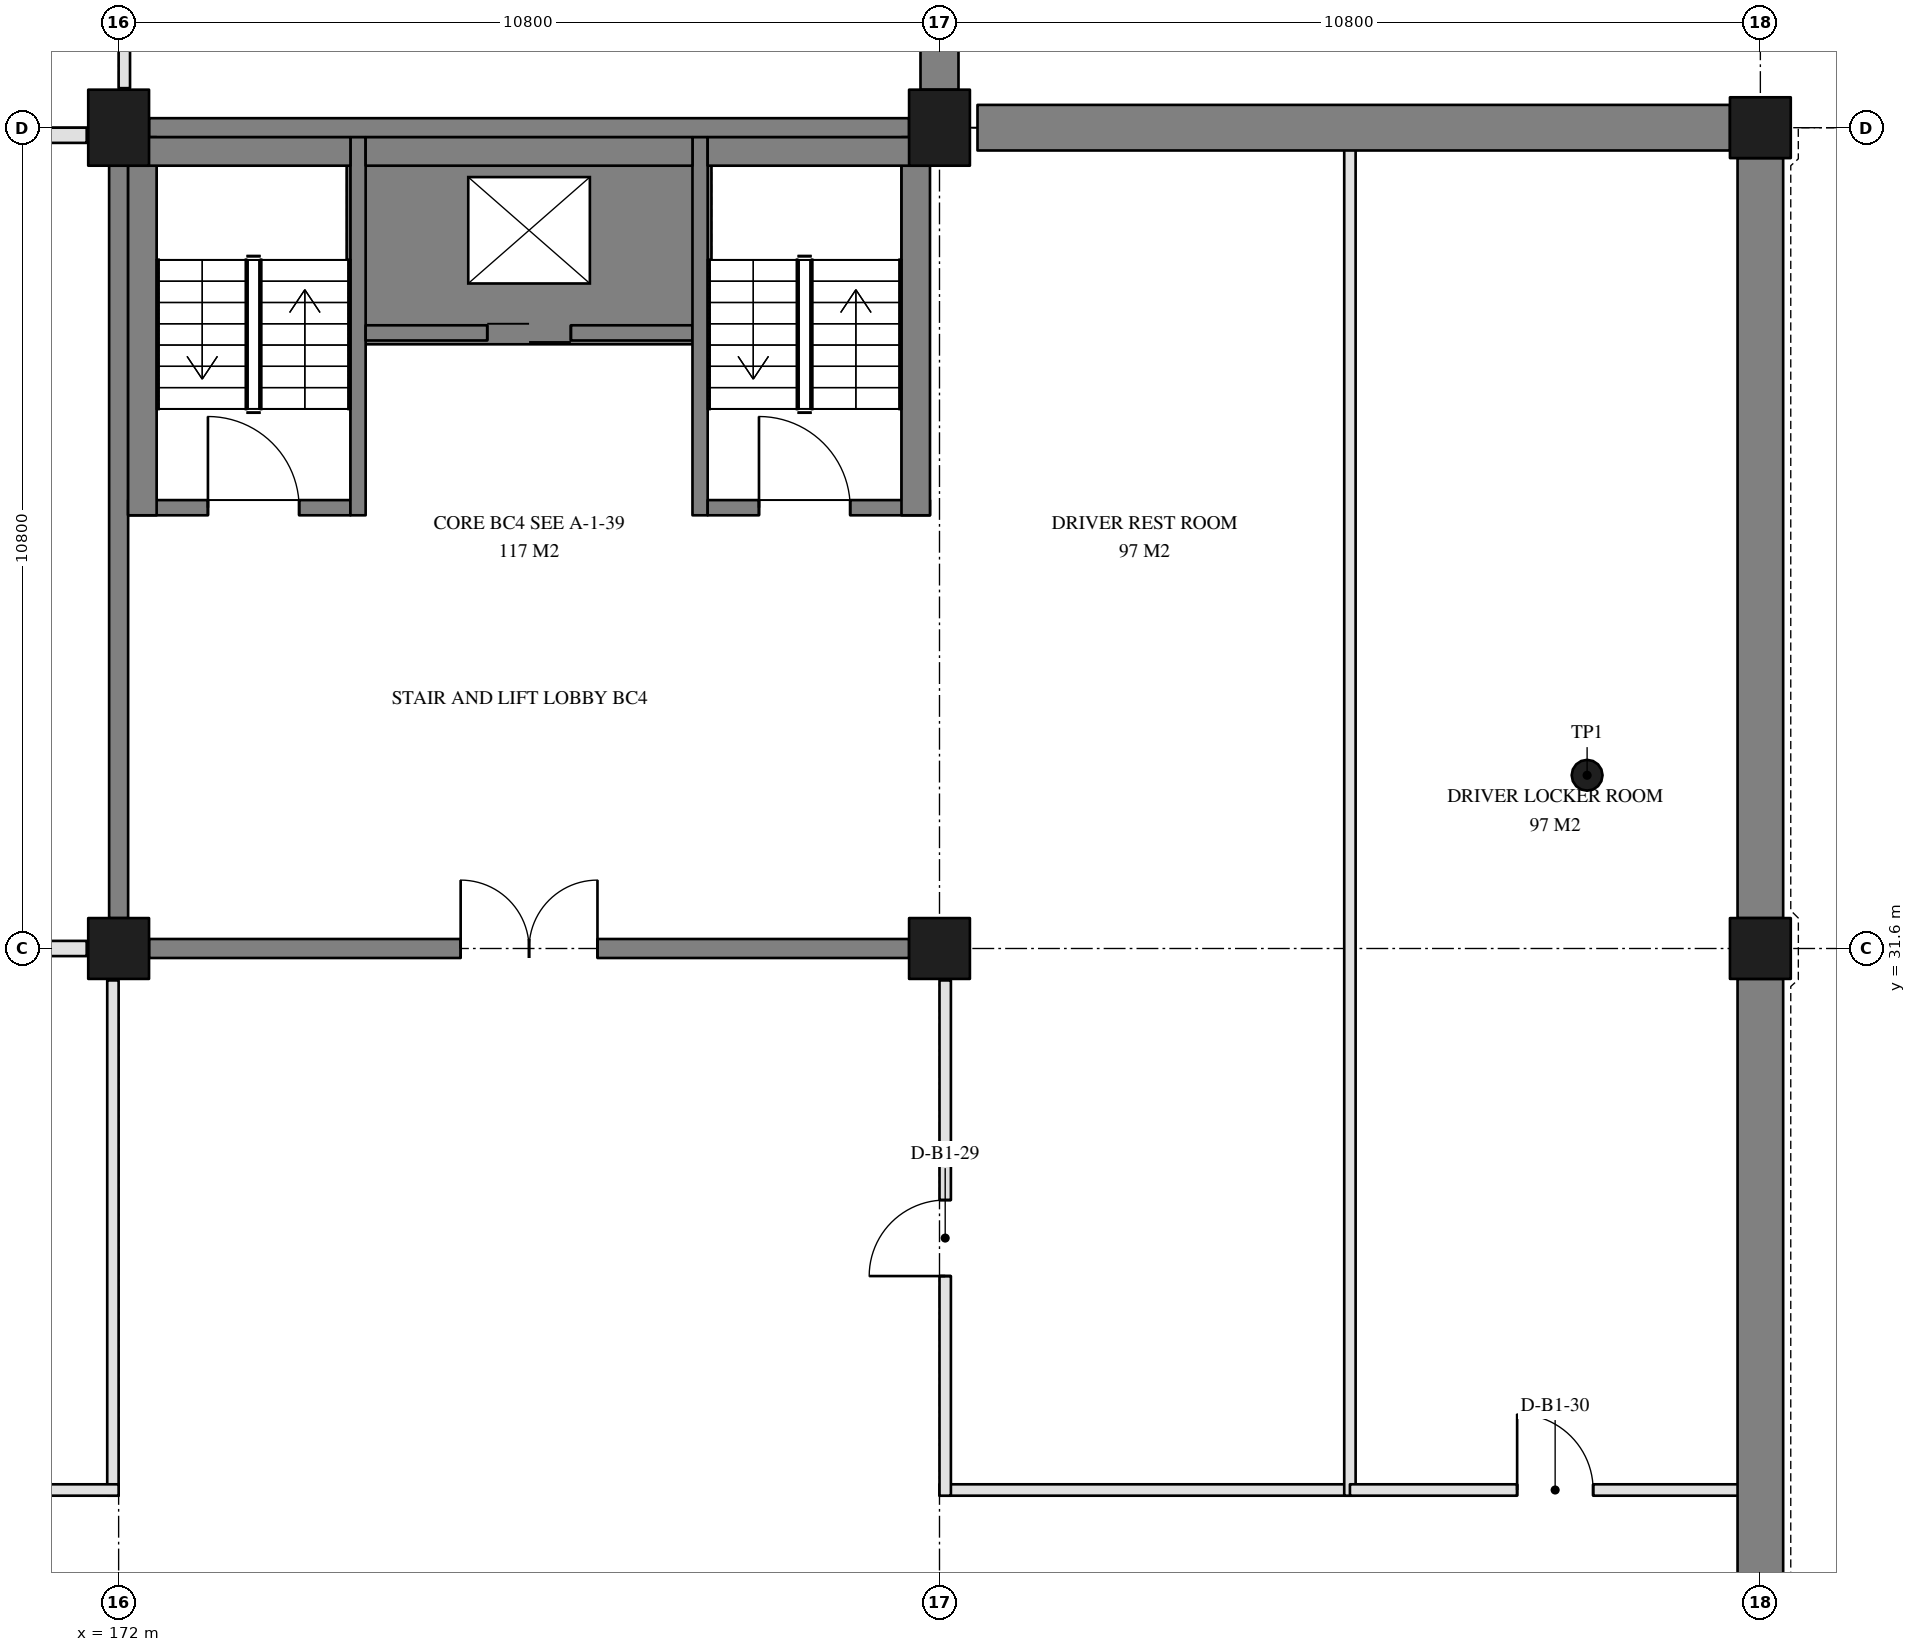
"""IFC4 building model, lengths in metres.
Left out: names, types, materials, properties, quantities, classifications, styles, units other than length and angle.
Written with IfcOpenShell. Run it as: python <this file> out.ifc"""

import sys

from ifc_helpers import new_model, si_unit, direction, frame, frame_2d, origin, origin_2d, place, context, subcontext, project, spatial, polyline, rectangle, hollow_circle, outline, extrude, element, fill, save


model = new_model("IFC4")
c1 = context("Model", 3, precision=1e-05, world=origin(), true_north=direction((0.0, 1.0)))
c2 = subcontext(c1, "Body", "Model", "MODEL_VIEW")
j1 = project(units=[si_unit("LENGTHUNIT", "METRE"), si_unit("PLANEANGLEUNIT", "RADIAN")], contexts=[c1])
p1 = place(None, origin())
s1 = spatial("IfcSite", under=j1, at=p1, CompositionType="ELEMENT")
p2 = place(p1, origin())
s2 = spatial("IfcBuilding", under=s1, at=p2, CompositionType="ELEMENT")
p3 = place(p2, frame((0.0, 0.0, -5.4)))
s3 = spatial("IfcBuildingStorey", under=s2, at=p3, CompositionType="ELEMENT", Elevation=-5.4)
for number, where, z_axis, x_axis in (
    (1, (172.0, 42.4, -0.4), (0.0, 0.0, 1.0), (1.0, 0.0, 0.0)),
    (2, (182.8, 42.4, -0.4), (0.0, 0.0, 1.0), (1.0, 0.0, 0.0)),
):
    element("IfcColumn", number, at=place(p3, frame(where, z_axis=z_axis, x_axis=x_axis)), inside=s3, PredefinedType="COLUMN", context=c2, shape_type="SweptSolid", body=[
        extrude(rectangle(XDim=0.8, YDim=1.0, at=origin_2d()), origin(), (0.0, 0.0, 1.0), 5.8),
    ])
for number, where, z_axis, x_axis in (
    (3, (172.0, 31.6, -0.4), (0.0, 0.0, 1.0), (1.0, 0.0, 0.0)),
    (4, (182.8, 31.6, -0.4), (0.0, 0.0, 1.0), (1.0, 0.0, 0.0)),
    (5, (193.6, 31.6, -0.4), (0.0, 0.0, 1.0), (1.0, 0.0, 0.0)),
    (6, (193.6, 42.4, -0.4), (0.0, 0.0, 1.0), (1.0, 0.0, 0.0)),
):
    element("IfcColumn", number, at=place(p3, frame(where, z_axis=z_axis, x_axis=x_axis)), inside=s3, PredefinedType="COLUMN", context=c2, shape_type="SweptSolid", body=[
        extrude(rectangle(XDim=0.8, YDim=0.8, at=origin_2d()), origin(), (0.0, 0.0, 1.0), 5.8),
    ])
p4 = place(p3, frame((191.321, 33.879, 3.6), z_axis=(0.0, 0.0, 1.0), x_axis=(1.0, 0.0, 0.0)))
e7 = element("IfcColumn", 7, at=p4, inside=s3, PredefinedType="COLUMN", context=c2, shape_type="SweptSolid", body=[
    extrude(hollow_circle(Radius=0.203, WallThickness=0.016, at=origin_2d()), origin(), (0.0, 0.0, 1.0), 1.8),
])
p5 = place(p3, frame((0.0, 0.0, -1.4)))
e8 = element("IfcWall", 8, at=p5, inside=s3, PredefinedType="SOLIDWALL", context=c2, shape_type="SweptSolid", body=[
    extrude(outline(polyline([(175.0, 39.55), (179.8, 39.55), (179.8, 42.15), (175.0, 42.15), (175.0, 39.55)]), holes=[polyline([(179.55, 39.8), (179.55, 41.9), (175.25, 41.9), (175.25, 39.8), (179.55, 39.8)])]), origin(), (0.0, 0.0, 1.0), 1.4),
])
p6 = place(p3, frame((172.4, 31.6, 0.0), z_axis=(0.0, 0.0, 1.0), x_axis=(1.0, 0.0, 0.0)))
e9 = element("IfcWall", 9, at=p6, inside=s3, PredefinedType="SOLIDWALL", context=c2, shape_type="SweptSolid", body=[
    extrude(rectangle(XDim=10.0, YDim=0.25, at=frame_2d((5.0, 0.0))), origin(), (0.0, 0.0, 1.0), 5.4),
])
p7 = place(p6, frame((4.1, 0.0, 0.0)))
e10 = element("IfcOpeningElement", 10, at=p7, cuts=e9, PredefinedType="OPENING", context=c2, shape_type="SweptSolid", body=[
    extrude(rectangle(XDim=1.8, YDim=2.1, at=frame_2d((0.9, 1.05))), frame((0.0, 0.135, 0.0), z_axis=(0.0, -1.0, 0.0), x_axis=(1.0, 0.0, 0.0)), (0.0, 0.0, 1.0), 0.27),
])
p8 = place(p3, frame((182.4, 42.4, 0.0), z_axis=(0.0, 0.0, 1.0), x_axis=(-1.0, 0.0, 0.0)))
e11 = element("IfcWall", 11, at=p8, inside=s3, PredefinedType="SOLIDWALL", context=c2, shape_type="SweptSolid", body=[
    extrude(rectangle(XDim=10.0, YDim=0.25, at=frame_2d((5.0, 0.0))), origin(), (0.0, 0.0, 1.0), 5.4),
])
p9 = place(p3, frame((172.0, 41.9, 0.0), z_axis=(0.0, 0.0, 1.0), x_axis=(0.0, -1.0, 0.0)))
e12 = element("IfcWall", 12, at=p9, inside=s3, PredefinedType="SOLIDWALL", context=c2, shape_type="SweptSolid", body=[
    extrude(rectangle(XDim=9.9, YDim=0.25, at=frame_2d((4.95, 0.0))), origin(), (0.0, 0.0, 1.0), 5.4),
])
for number, where, z_axis, x_axis in (
    (13, (193.6, 21.2, 0.0), (0.0, 0.0, 1.0), (0.0, 1.0, 0.0)),
    (14, (193.6, 32.0, 0.0), (0.0, 0.0, 1.0), (0.0, 1.0, 0.0)),
):
    element("IfcWall", number, at=place(p3, frame(where, z_axis=z_axis, x_axis=x_axis)), inside=s3, PredefinedType="SOLIDWALL", context=c2, shape_type="SweptSolid", body=[
        extrude(rectangle(XDim=10.0, YDim=0.6, at=frame_2d((5.0, 0.0))), origin(), (0.0, 0.0, 1.0), 3.8),
    ])
p10 = place(p3, frame((183.3, 42.4, 0.0), z_axis=(0.0, 0.0, 1.0), x_axis=(1.0, 0.0, 0.0)))
e15 = element("IfcWall", 15, at=p10, inside=s3, PredefinedType="SOLIDWALL", context=c2, shape_type="SweptSolid", body=[
    extrude(rectangle(XDim=9.9, YDim=0.6, at=frame_2d((4.95, 0.0))), origin(), (0.0, 0.0, 1.0), 3.8),
])
p11 = place(p3, frame((182.8, 42.9, 0.0), z_axis=(0.0, 0.0, 1.0), x_axis=(0.0, 1.0, 0.0)))
e16 = element("IfcWall", 16, at=p11, inside=s3, PredefinedType="SOLIDWALL", context=c2, shape_type="SweptSolid", body=[
    extrude(rectangle(XDim=9.8, YDim=0.5, at=frame_2d((4.9, 0.0))), origin(), (0.0, 0.0, 1.0), 3.8),
])
p12 = place(p3, frame((172.125, 37.4, 0.0), z_axis=(0.0, 0.0, 1.0), x_axis=(1.0, 0.0, 0.0)))
e17 = element("IfcWall", 17, at=p12, inside=s3, PredefinedType="SOLIDWALL", context=c2, shape_type="SweptSolid", body=[
    extrude(rectangle(XDim=2.925, YDim=0.2, at=frame_2d((1.462, 0.0))), origin(), (0.0, 0.0, 1.0), 4.8),
])
p13 = place(p12, frame((1.05, 0.0, 0.0)))
e18 = element("IfcOpeningElement", 18, at=p13, cuts=e17, PredefinedType="OPENING", context=c2, shape_type="SweptSolid", body=[
    extrude(rectangle(XDim=1.2, YDim=2.1, at=frame_2d((0.6, 1.05))), frame((0.0, 0.11, 0.0), z_axis=(0.0, -1.0, 0.0), x_axis=(1.0, 0.0, 0.0)), (0.0, 0.0, 1.0), 0.22),
])
p14 = place(p3, frame((175.15, 37.3, 0.0), z_axis=(0.0, 0.0, 1.0), x_axis=(0.0, 1.0, 0.0)))
e19 = element("IfcWall", 19, at=p14, inside=s3, PredefinedType="SOLIDWALL", context=c2, shape_type="SweptSolid", body=[
    extrude(rectangle(XDim=4.975, YDim=0.2, at=frame_2d((2.487, 0.0))), origin(), (0.0, 0.0, 1.0), 4.8),
])
p15 = place(p3, frame((175.25, 39.7, 0.0), z_axis=(0.0, 0.0, 1.0), x_axis=(1.0, 0.0, 0.0)))
e20 = element("IfcWall", 20, at=p15, inside=s3, PredefinedType="SOLIDWALL", context=c2, shape_type="SweptSolid", body=[
    extrude(rectangle(XDim=4.3, YDim=0.2, at=frame_2d((2.15, 0.0))), origin(), (0.0, 0.0, 1.0), 4.8),
])
p16 = place(p15, frame((1.6, 0.0, 0.0)))
e21 = element("IfcOpeningElement", 21, at=p16, cuts=e20, PredefinedType="OPENING", context=c2, shape_type="SweptSolid", body=[
    extrude(rectangle(XDim=1.1, YDim=2.1, at=frame_2d((0.55, 1.05))), frame((0.0, 0.11, 0.0), z_axis=(0.0, -1.0, 0.0), x_axis=(1.0, 0.0, 0.0)), (0.0, 0.0, 1.0), 0.22),
])
p17 = place(p3, frame((179.65, 37.3, 0.0), z_axis=(0.0, 0.0, 1.0), x_axis=(0.0, 1.0, 0.0)))
e22 = element("IfcWall", 22, at=p17, inside=s3, PredefinedType="SOLIDWALL", context=c2, shape_type="SweptSolid", body=[
    extrude(rectangle(XDim=4.975, YDim=0.2, at=frame_2d((2.487, 0.0))), origin(), (0.0, 0.0, 1.0), 4.8),
])
p18 = place(p3, frame((179.75, 37.4, 0.0), z_axis=(0.0, 0.0, 1.0), x_axis=(1.0, 0.0, 0.0)))
e23 = element("IfcWall", 23, at=p18, inside=s3, PredefinedType="SOLIDWALL", context=c2, shape_type="SweptSolid", body=[
    extrude(rectangle(XDim=2.925, YDim=0.2, at=frame_2d((1.462, 0.0))), origin(), (0.0, 0.0, 1.0), 4.8),
])
p19 = place(p18, frame((0.675, 0.0, 0.0)))
e24 = element("IfcOpeningElement", 24, at=p19, cuts=e23, PredefinedType="OPENING", context=c2, shape_type="SweptSolid", body=[
    extrude(rectangle(XDim=1.2, YDim=2.1, at=frame_2d((0.6, 1.05))), frame((0.0, 0.11, 0.0), z_axis=(0.0, -1.0, 0.0), x_axis=(1.0, 0.0, 0.0)), (0.0, 0.0, 1.0), 0.22),
])
p20 = place(p3, frame((172.312, 37.3, 0.0), z_axis=(0.0, 0.0, 1.0), x_axis=(0.0, 1.0, 0.0)))
e25 = element("IfcWall", 25, at=p20, inside=s3, PredefinedType="SOLIDWALL", context=c2, shape_type="SweptSolid", body=[
    extrude(rectangle(XDim=4.975, YDim=0.375, at=frame_2d((2.487, 0.0))), origin(), (0.0, 0.0, 1.0), 4.8),
])
p21 = place(p3, frame((172.125, 42.087, 0.0), z_axis=(0.0, 0.0, 1.0), x_axis=(1.0, 0.0, 0.0)))
e26 = element("IfcWall", 26, at=p21, inside=s3, PredefinedType="SOLIDWALL", context=c2, shape_type="SweptSolid", body=[
    extrude(rectangle(XDim=2.925, YDim=0.375, at=frame_2d((1.462, 0.0))), origin(), (0.0, 0.0, 1.0), 4.8),
])
p22 = place(p3, frame((182.488, 37.3, 0.0), z_axis=(0.0, 0.0, 1.0), x_axis=(0.0, 1.0, 0.0)))
e27 = element("IfcWall", 27, at=p22, inside=s3, PredefinedType="SOLIDWALL", context=c2, shape_type="SweptSolid", body=[
    extrude(rectangle(XDim=4.975, YDim=0.375, at=frame_2d((2.487, 0.0))), origin(), (0.0, 0.0, 1.0), 4.8),
])
p23 = place(p3, frame((179.75, 42.087, 0.0), z_axis=(0.0, 0.0, 1.0), x_axis=(1.0, 0.0, 0.0)))
e28 = element("IfcWall", 28, at=p23, inside=s3, PredefinedType="SOLIDWALL", context=c2, shape_type="SweptSolid", body=[
    extrude(rectangle(XDim=2.925, YDim=0.375, at=frame_2d((1.462, 0.0))), origin(), (0.0, 0.0, 1.0), 4.8),
])
p24 = place(p3, frame((175.25, 42.087, 0.0), z_axis=(0.0, 0.0, 1.0), x_axis=(1.0, 0.0, 0.0)))
e29 = element("IfcWall", 29, at=p24, inside=s3, PredefinedType="SOLIDWALL", context=c2, shape_type="SweptSolid", body=[
    extrude(rectangle(XDim=4.3, YDim=0.375, at=frame_2d((2.15, 0.0))), origin(), (0.0, 0.0, 1.0), 4.8),
])
p25 = place(p3, frame((172.075, 42.92, 0.0), z_axis=(0.0, 0.0, 1.0), x_axis=(0.0, 1.0, 0.0)))
e30 = element("IfcWall", 30, at=p25, inside=s3, PredefinedType="PARTITIONING", context=c2, shape_type="SweptSolid", body=[
    extrude(rectangle(XDim=9.76, YDim=0.15, at=frame_2d((4.88, 0.0))), origin(), (0.0, 0.0, 1.0), 3.8),
])
p26 = place(p25, frame((3.98, 0.0, 0.0)))
e31 = element("IfcOpeningElement", 31, at=p26, cuts=e30, PredefinedType="OPENING", context=c2, shape_type="SweptSolid", body=[
    extrude(rectangle(XDim=1.8, YDim=2.1, at=frame_2d((0.9, 1.05))), frame((0.0, 0.085, 0.0), z_axis=(0.0, -1.0, 0.0), x_axis=(1.0, 0.0, 0.0)), (0.0, 0.0, 1.0), 0.17),
])
p27 = place(p3, frame((161.62, 42.3, 0.0), z_axis=(0.0, 0.0, 1.0), x_axis=(1.0, 0.0, 0.0)))
e32 = element("IfcWall", 32, at=p27, inside=s3, PredefinedType="PARTITIONING", context=c2, shape_type="SweptSolid", body=[
    extrude(rectangle(XDim=9.96, YDim=0.2, at=frame_2d((4.98, 0.0))), origin(), (0.0, 0.0, 1.0), 3.8),
])
p28 = place(p27, frame((4.08, 0.0, 0.0)))
e33 = element("IfcOpeningElement", 33, at=p28, cuts=e32, PredefinedType="OPENING", context=c2, shape_type="SweptSolid", body=[
    extrude(rectangle(XDim=1.8, YDim=2.1, at=frame_2d((0.9, 1.05))), frame((0.0, 0.11, 0.0), z_axis=(0.0, -1.0, 0.0), x_axis=(1.0, 0.0, 0.0)), (0.0, 0.0, 1.0), 0.22),
])
p29 = place(p3, frame((161.62, 31.6, 0.0), z_axis=(0.0, 0.0, 1.0), x_axis=(1.0, 0.0, 0.0)))
e34 = element("IfcWall", 34, at=p29, inside=s3, PredefinedType="PARTITIONING", context=c2, shape_type="SweptSolid", body=[
    extrude(rectangle(XDim=9.96, YDim=0.2, at=frame_2d((4.98, 0.0))), origin(), (0.0, 0.0, 1.0), 3.8),
])
p30 = place(p3, frame((171.925, 24.4, 0.0), z_axis=(0.0, 0.0, 1.0), x_axis=(0.0, 1.0, 0.0)))
e35 = element("IfcWall", 35, at=p30, inside=s3, PredefinedType="PARTITIONING", context=c2, shape_type="SweptSolid", body=[
    extrude(rectangle(XDim=6.78, YDim=0.15, at=frame_2d((3.39, 0.0))), origin(), (0.0, 0.0, 1.0), 3.8),
])
p31 = place(p3, frame((161.2, 24.475, 0.0), z_axis=(0.0, 0.0, 1.0), x_axis=(1.0, 0.0, 0.0)))
e36 = element("IfcWall", 36, at=p31, inside=s3, PredefinedType="PARTITIONING", context=c2, shape_type="SweptSolid", body=[
    extrude(rectangle(XDim=10.8, YDim=0.15, at=frame_2d((5.4, 0.0))), origin(), (0.0, 0.0, 1.0), 3.8),
])
p32 = place(p31, frame((4.9, 0.0, 0.0)))
e37 = element("IfcOpeningElement", 37, at=p32, cuts=e36, PredefinedType="OPENING", context=c2, shape_type="SweptSolid", body=[
    extrude(rectangle(XDim=1.0, YDim=2.1, at=frame_2d((0.5, 1.05))), frame((0.0, 0.085, 0.0), z_axis=(0.0, -1.0, 0.0), x_axis=(1.0, 0.0, 0.0)), (0.0, 0.0, 1.0), 0.17),
])
p33 = place(p3, frame((182.8, 24.475, 0.0), z_axis=(0.0, 0.0, 1.0), x_axis=(1.0, 0.0, 0.0)))
e38 = element("IfcWall", 38, at=p33, inside=s3, PredefinedType="PARTITIONING", context=c2, shape_type="SweptSolid", body=[
    extrude(rectangle(XDim=5.4, YDim=0.15, at=frame_2d((2.7, 0.0))), origin(), (0.0, 0.0, 1.0), 3.8),
])
p34 = place(p3, frame((182.875, 24.4, 0.0), z_axis=(0.0, 0.0, 1.0), x_axis=(0.0, 1.0, 0.0)))
e39 = element("IfcWall", 39, at=p34, inside=s3, PredefinedType="PARTITIONING", context=c2, shape_type="SweptSolid", body=[
    extrude(rectangle(XDim=6.78, YDim=0.15, at=frame_2d((3.39, 0.0))), origin(), (0.0, 0.0, 1.0), 3.8),
])
p35 = place(p34, frame((2.89, 0.0, 0.0)))
e40 = element("IfcOpeningElement", 40, at=p35, cuts=e39, PredefinedType="OPENING", context=c2, shape_type="SweptSolid", body=[
    extrude(rectangle(XDim=1.0, YDim=2.1, at=frame_2d((0.5, 1.05))), frame((0.0, 0.085, 0.0), z_axis=(0.0, -1.0, 0.0), x_axis=(1.0, 0.0, 0.0)), (0.0, 0.0, 1.0), 0.17),
])
p36 = place(p3, frame((188.2, 24.4, 0.0), z_axis=(0.0, 0.0, 1.0), x_axis=(0.0, 1.0, 0.0)))
e41 = element("IfcWall", 41, at=p36, inside=s3, PredefinedType="PARTITIONING", context=c2, shape_type="SweptSolid", body=[
    extrude(rectangle(XDim=18.0, YDim=0.15, at=frame_2d((9.0, 0.0))), origin(), (0.0, 0.0, 1.0), 3.8),
])
p37 = place(p3, frame((188.2, 24.475, 0.0), z_axis=(0.0, 0.0, 1.0), x_axis=(1.0, 0.0, 0.0)))
e42 = element("IfcWall", 42, at=p37, inside=s3, PredefinedType="PARTITIONING", context=c2, shape_type="SweptSolid", body=[
    extrude(rectangle(XDim=5.4, YDim=0.15, at=frame_2d((2.7, 0.0))), origin(), (0.0, 0.0, 1.0), 3.8),
])
p38 = place(p37, frame((2.2, 0.0, 0.0)))
e43 = element("IfcOpeningElement", 43, at=p38, cuts=e42, PredefinedType="OPENING", context=c2, shape_type="SweptSolid", body=[
    extrude(rectangle(XDim=1.0, YDim=2.1, at=frame_2d((0.5, 1.05))), frame((0.0, 0.085, 0.0), z_axis=(0.0, -1.0, 0.0), x_axis=(1.0, 0.0, 0.0)), (0.0, 0.0, 1.0), 0.17),
])
p39 = place(p16, frame((1.1, 0.0, 0.0), z_axis=(0.0, 0.0, 1.0), x_axis=(-1.0, 0.0, 0.0)))
e44 = element("IfcDoor", 44, at=p39, inside=s3, OperationType="DOUBLE_DOOR_SLIDING", PredefinedType="DOOR", context=c2, shape_type="SweptSolid", body=[
    extrude(rectangle(XDim=1.1, YDim=2.1, at=frame_2d((0.55, 1.05))), frame((0.0, 0.025, 0.0), z_axis=(0.0, -1.0, 0.0), x_axis=(1.0, 0.0, 0.0)), (0.0, 0.0, 1.0), 0.05),
])
fill(e21, e44)
p40 = place(p13, frame((1.2, 0.0, 0.0), z_axis=(0.0, 0.0, 1.0), x_axis=(-1.0, 0.0, 0.0)))
e45 = element("IfcDoor", 45, at=p40, inside=s3, OperationType="SINGLE_SWING_LEFT", PredefinedType="DOOR", context=c2, shape_type="SweptSolid", body=[
    extrude(rectangle(XDim=1.2, YDim=2.1, at=frame_2d((0.6, 1.05))), frame((0.0, 0.025, 0.0), z_axis=(0.0, -1.0, 0.0), x_axis=(1.0, 0.0, 0.0)), (0.0, 0.0, 1.0), 0.05),
])
fill(e18, e45)
p41 = place(p19, frame((1.2, 0.0, 0.0), z_axis=(0.0, 0.0, 1.0), x_axis=(-1.0, 0.0, 0.0)))
e46 = element("IfcDoor", 46, at=p41, inside=s3, OperationType="SINGLE_SWING_RIGHT", PredefinedType="DOOR", context=c2, shape_type="SweptSolid", body=[
    extrude(rectangle(XDim=1.2, YDim=2.1, at=frame_2d((0.6, 1.05))), frame((0.0, 0.025, 0.0), z_axis=(0.0, -1.0, 0.0), x_axis=(1.0, 0.0, 0.0)), (0.0, 0.0, 1.0), 0.05),
])
fill(e24, e46)
p42 = place(p7, frame((1.8, 0.0, 0.0), z_axis=(0.0, 0.0, 1.0), x_axis=(-1.0, 0.0, 0.0)))
e47 = element("IfcDoor", 47, at=p42, inside=s3, OperationType="DOUBLE_DOOR_DOUBLE_SWING", PredefinedType="DOOR", context=c2, shape_type="SweptSolid", body=[
    extrude(rectangle(XDim=1.8, YDim=2.1, at=frame_2d((0.9, 1.05))), frame((0.0, 0.025, 0.0), z_axis=(0.0, -1.0, 0.0), x_axis=(1.0, 0.0, 0.0)), (0.0, 0.0, 1.0), 0.05),
])
fill(e10, e47)
p43 = place(p35, frame((1.0, 0.0, 0.0), z_axis=(0.0, 0.0, 1.0), x_axis=(-1.0, 0.0, 0.0)))
e48 = element("IfcDoor", 48, at=p43, inside=s3, OperationType="SINGLE_SWING_RIGHT", PredefinedType="DOOR", context=c2, shape_type="SweptSolid", body=[
    extrude(rectangle(XDim=1.0, YDim=2.1, at=frame_2d((0.5, 1.05))), frame((0.0, 0.025, 0.0), z_axis=(0.0, -1.0, 0.0), x_axis=(1.0, 0.0, 0.0)), (0.0, 0.0, 1.0), 0.05),
])
fill(e40, e48)
p44 = place(p38, origin())
e49 = element("IfcDoor", 49, at=p44, inside=s3, OperationType="SINGLE_SWING_LEFT", PredefinedType="DOOR", context=c2, shape_type="SweptSolid", body=[
    extrude(rectangle(XDim=1.0, YDim=2.1, at=frame_2d((0.5, 1.05))), frame((0.0, 0.025, 0.0), z_axis=(0.0, -1.0, 0.0), x_axis=(1.0, 0.0, 0.0)), (0.0, 0.0, 1.0), 0.05),
])
fill(e43, e49)
save(model, sys.argv[1])
